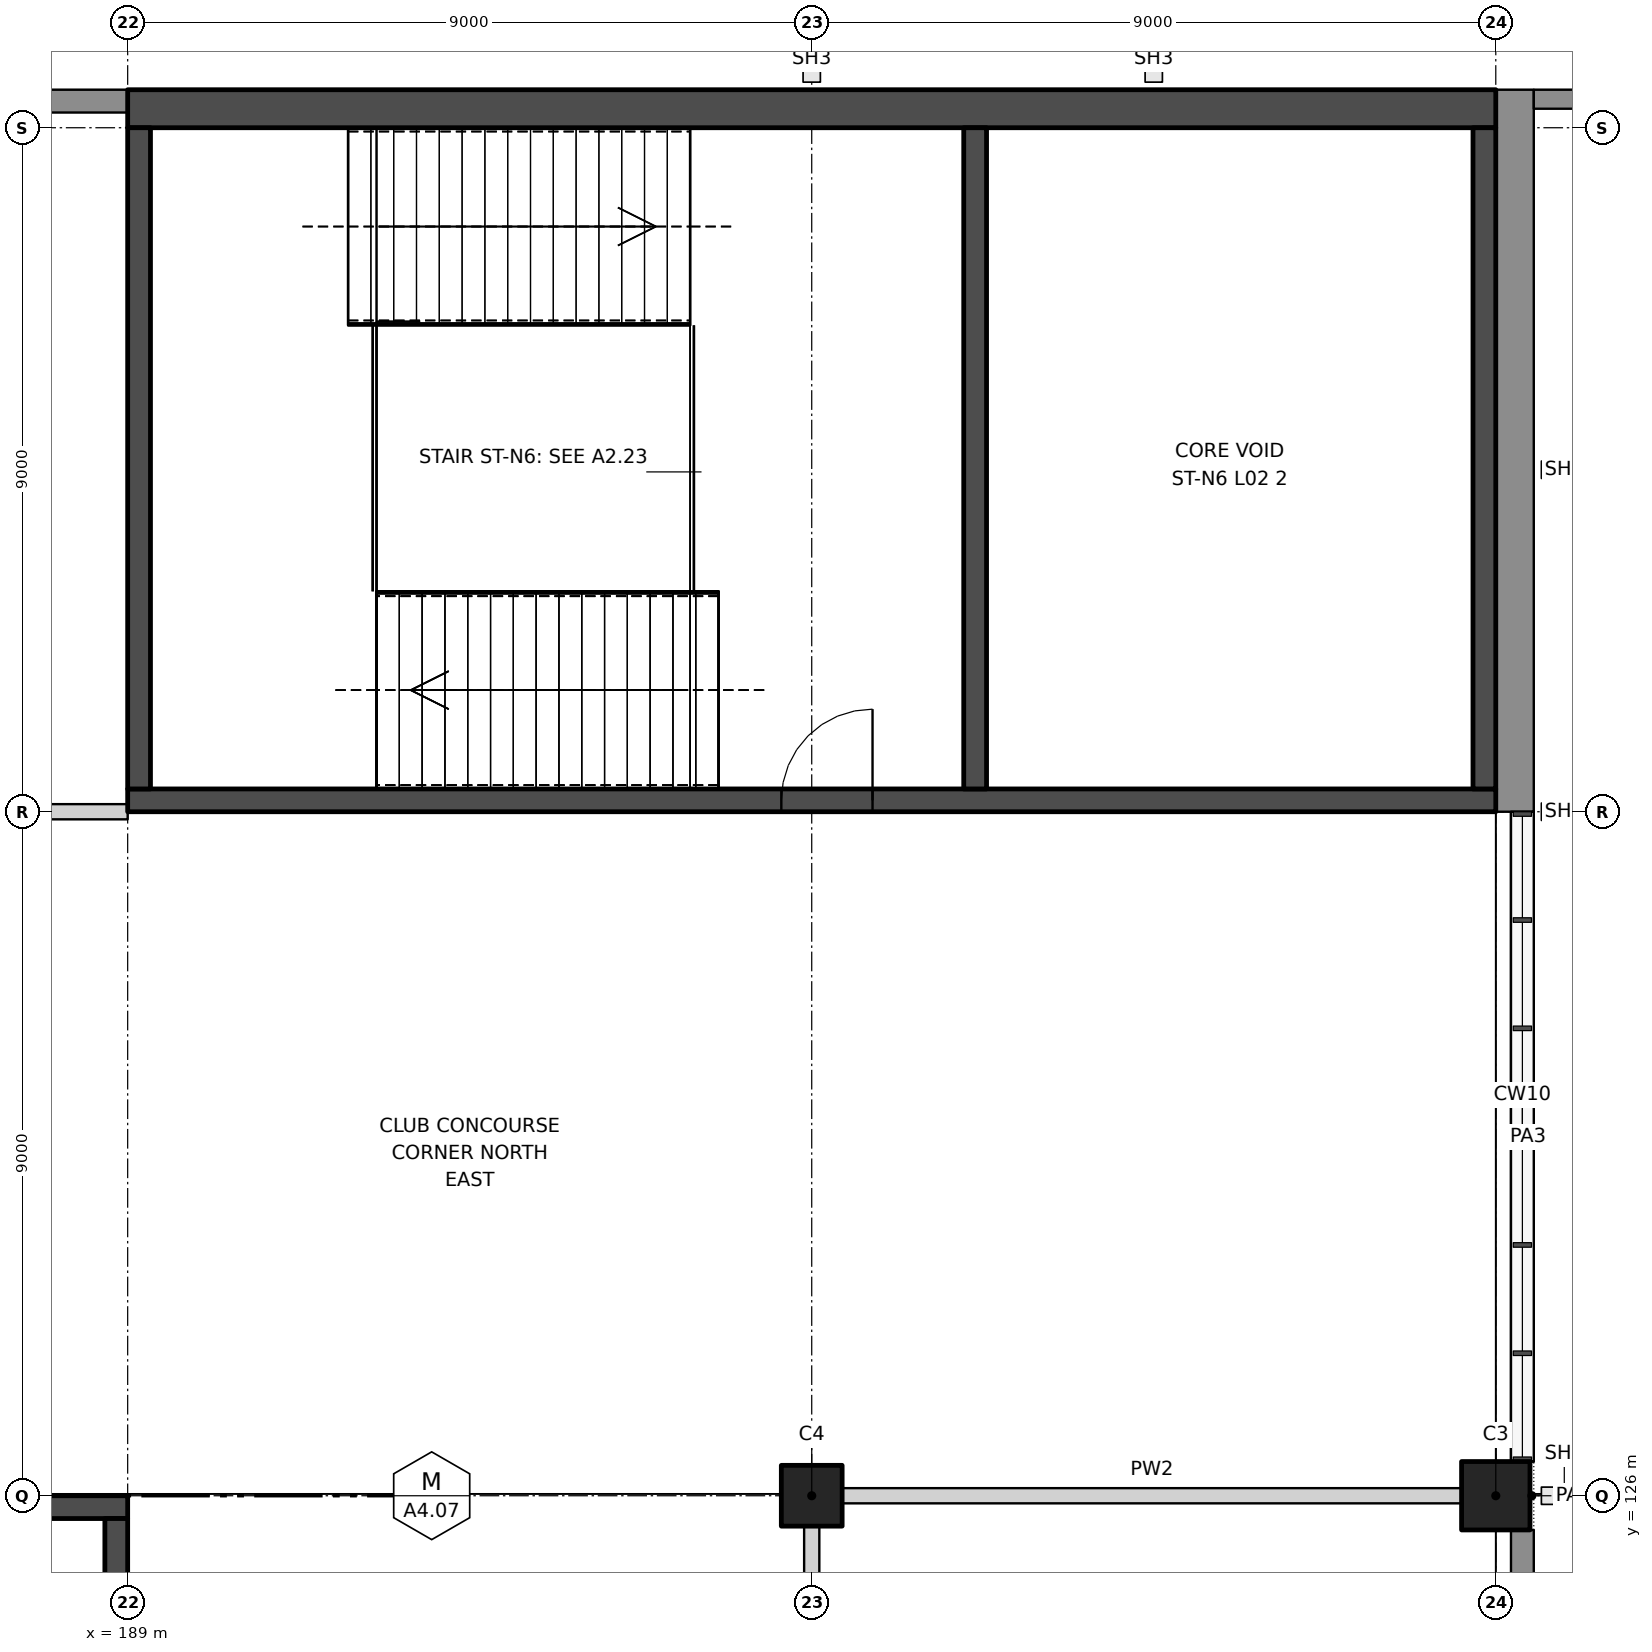
"""IFC4 building model, lengths in metres.
Left out: names, types, materials, properties, quantities, classifications, styles, units other than length and angle.
Written with IfcOpenShell. Run it as: python <this file> out.ifc"""

import sys

from ifc_helpers import new_model, si_unit, direction, frame, frame_2d, origin, origin_2d, place, context, subcontext, project, spatial, rectangle, extrude, element, fill, save


model = new_model("IFC4")
c1 = context("Model", 3, precision=1e-05, world=origin(), true_north=direction((0.0, 1.0)))
c2 = subcontext(c1, "Body", "Model", "MODEL_VIEW")
j1 = project(units=[si_unit("LENGTHUNIT", "METRE"), si_unit("PLANEANGLEUNIT", "RADIAN")], contexts=[c1])
p1 = place(None, origin())
s1 = spatial("IfcSite", under=j1, at=p1, CompositionType="ELEMENT")
p2 = place(p1, origin())
s2 = spatial("IfcBuilding", under=s1, at=p2, CompositionType="ELEMENT")
p3 = place(p2, frame((0.0, 0.0, 11.5)))
s3 = spatial("IfcBuildingStorey", under=s2, at=p3, CompositionType="ELEMENT", Elevation=11.5)
p4 = place(p3, frame((207.0, 126.0, 0.0), z_axis=(0.0, 0.0, 1.0), x_axis=(1.0, 0.0, 0.0)))
e1 = element("IfcColumn", 1, at=p4, inside=s3, PredefinedType="COLUMN", context=c2, shape_type="SweptSolid", body=[
    extrude(rectangle(XDim=0.9, YDim=0.9, at=origin_2d()), origin(), (0.0, 0.0, 1.0), 10.5),
])
p5 = place(p3, frame((198.0, 126.0, 0.0), z_axis=(0.0, 0.0, 1.0), x_axis=(1.0, 0.0, 0.0)))
e2 = element("IfcColumn", 2, at=p5, inside=s3, PredefinedType="COLUMN", context=c2, shape_type="SweptSolid", body=[
    extrude(rectangle(XDim=0.8, YDim=0.8, at=origin_2d()), origin(), (0.0, 0.0, 1.0), 10.5),
])
p6 = place(p3, frame((198.4, 126.0, 0.0), z_axis=(0.0, 0.0, 1.0), x_axis=(1.0, 0.0, 0.0)))
e3 = element("IfcWall", 3, at=p6, inside=s3, PredefinedType="PARTITIONING", context=c2, shape_type="SweptSolid", body=[
    extrude(rectangle(XDim=8.15, YDim=0.2, at=frame_2d((4.075, 0.0))), origin(), (0.0, 0.0, 1.0), 9.25),
])
p7 = place(p3, frame((186.1, 135.0, 0.0), z_axis=(0.0, 0.0, 1.0), x_axis=(1.0, 0.0, 0.0)))
e4 = element("IfcWall", 4, at=p7, inside=s3, PredefinedType="PARTITIONING", context=c2, shape_type="SweptSolid", body=[
    extrude(rectangle(XDim=2.9, YDim=0.2, at=frame_2d((1.45, 0.0))), origin(), (0.0, 0.0, 1.0), 9.15),
])
p8 = place(p3, frame((198.0, 117.4, 0.0), z_axis=(0.0, 0.0, 1.0), x_axis=(0.0, 1.0, 0.0)))
e5 = element("IfcWall", 5, at=p8, inside=s3, PredefinedType="PARTITIONING", context=c2, shape_type="SweptSolid", body=[
    extrude(rectangle(XDim=8.2, YDim=0.2, at=frame_2d((4.1, 0.0))), origin(), (0.0, 0.0, 1.0), 9.25),
])
p9 = place(p8, frame((3.6, 0.0, 0.0)))
e6 = element("IfcOpeningElement", 6, at=p9, cuts=e5, PredefinedType="OPENING", context=c2, shape_type="SweptSolid", body=[
    extrude(rectangle(XDim=1.0, YDim=2.1, at=frame_2d((0.5, 1.05))), frame((0.0, 0.11, 0.0), z_axis=(0.0, -1.0, 0.0), x_axis=(1.0, 0.0, 0.0)), (0.0, 0.0, 1.0), 0.22),
])
p10 = place(p3, frame((207.35, 117.45, 0.0), z_axis=(0.0, 0.0, 1.0), x_axis=(0.0, 1.0, 0.0)))
e7 = element("IfcWall", 7, at=p10, inside=s3, PredefinedType="SOLIDWALL", context=c2, shape_type="SweptSolid", body=[
    extrude(rectangle(XDim=8.1, YDim=0.3, at=frame_2d((4.05, 0.0))), origin(), (0.0, 0.0, 1.0), 10.5),
])
p11 = place(p3, frame((207.35, 126.45, 0.0), z_axis=(0.0, 0.0, 1.0), x_axis=(0.0, 1.0, 0.0)))
e8 = element("IfcWall", 8, at=p11, inside=s3, PredefinedType="SOLIDWALL", context=c2, shape_type="SweptSolid", body=[
    extrude(rectangle(XDim=8.55, YDim=0.3, at=frame_2d((4.275, 0.0))), origin(), (0.0, 0.0, 1.0), 1.0),
])
p12 = place(p3, frame((207.25, 135.0, 0.0), z_axis=(0.0, 0.0, 1.0), x_axis=(0.0, 1.0, 0.0)))
e9 = element("IfcWall", 9, at=p12, inside=s3, PredefinedType="SOLIDWALL", context=c2, shape_type="SweptSolid", body=[
    extrude(rectangle(XDim=9.5, YDim=0.5, at=frame_2d((4.75, 0.0))), origin(), (0.0, 0.0, 1.0), 10.5),
])
p13 = place(p3, frame((189.0, 144.35, 0.0), z_axis=(0.0, 0.0, 1.0), x_axis=(-1.0, 0.0, 0.0)))
e10 = element("IfcWall", 10, at=p13, inside=s3, PredefinedType="SOLIDWALL", context=c2, shape_type="SweptSolid", body=[
    extrude(rectangle(XDim=9.0, YDim=0.3, at=frame_2d((4.5, 0.0))), origin(), (0.0, 0.0, 1.0), 10.5),
])
p14 = place(p3, frame((221.0, 144.375, 0.0), z_axis=(0.0, 0.0, 1.0), x_axis=(-1.0, 0.0, 0.0)))
e11 = element("IfcWall", 11, at=p14, inside=s3, PredefinedType="PARAPET", context=c2, shape_type="SweptSolid", body=[
    extrude(rectangle(XDim=13.5, YDim=0.25, at=frame_2d((6.75, 0.0))), origin(), (0.0, 0.0, 1.0), 1.2),
])
p15 = place(p3, frame((189.0, 135.15, 0.0), z_axis=(0.0, 0.0, 1.0), x_axis=(1.0, 0.0, 0.0)))
e12 = element("IfcWall", 12, at=p15, inside=s3, PredefinedType="SHEAR", context=c2, shape_type="SweptSolid", body=[
    extrude(rectangle(XDim=18.0, YDim=0.3, at=frame_2d((9.0, 0.0))), origin(), (0.0, 0.0, 1.0), 10.5),
])
p16 = place(p15, frame((8.6, 0.0, 0.0)))
e13 = element("IfcOpeningElement", 13, at=p16, cuts=e12, PredefinedType="OPENING", context=c2, shape_type="SweptSolid", body=[
    extrude(rectangle(XDim=1.2, YDim=2.1, at=frame_2d((0.6, 1.05))), frame((0.0, 0.16, 0.0), z_axis=(0.0, -1.0, 0.0), x_axis=(1.0, 0.0, 0.0)), (0.0, 0.0, 1.0), 0.32),
])
p17 = place(p3, frame((189.0, 144.25, 0.0), z_axis=(0.0, 0.0, 1.0), x_axis=(1.0, 0.0, 0.0)))
e14 = element("IfcWall", 14, at=p17, inside=s3, PredefinedType="SHEAR", context=c2, shape_type="SweptSolid", body=[
    extrude(rectangle(XDim=18.0, YDim=0.5, at=frame_2d((9.0, 0.0))), origin(), (0.0, 0.0, 1.0), 10.5),
])
for number, where, z_axis, x_axis in (
    (15, (189.15, 135.3, 0.0), (0.0, 0.0, 1.0), (0.0, 1.0, 0.0)),
    (16, (206.85, 135.3, 0.0), (0.0, 0.0, 1.0), (0.0, 1.0, 0.0)),
    (17, (200.15, 135.3, 0.0), (0.0, 0.0, 1.0), (0.0, 1.0, 0.0)),
):
    element("IfcWall", number, at=place(p3, frame(where, z_axis=z_axis, x_axis=x_axis)), inside=s3, PredefinedType="SHEAR", context=c2, shape_type="SweptSolid", body=[
        extrude(rectangle(XDim=8.7, YDim=0.3, at=frame_2d((4.35, 0.0))), origin(), (0.0, 0.0, 1.0), 10.5),
    ])
p18 = place(p3, frame((171.0, 125.85, 0.0), z_axis=(0.0, 0.0, 1.0), x_axis=(1.0, 0.0, 0.0)))
e18 = element("IfcWall", 18, at=p18, inside=s3, PredefinedType="SHEAR", context=c2, shape_type="SweptSolid", body=[
    extrude(rectangle(XDim=18.0, YDim=0.3, at=frame_2d((9.0, 0.0))), origin(), (0.0, 0.0, 1.0), 10.5),
])
p19 = place(p3, frame((188.85, 117.3, 0.0), z_axis=(0.0, 0.0, 1.0), x_axis=(0.0, 1.0, 0.0)))
e19 = element("IfcWall", 19, at=p19, inside=s3, PredefinedType="SHEAR", context=c2, shape_type="SweptSolid", body=[
    extrude(rectangle(XDim=8.4, YDim=0.3, at=frame_2d((4.2, 0.0))), origin(), (0.0, 0.0, 1.0), 10.5),
])
p20 = place(p16, origin())
e20 = element("IfcDoor", 20, at=p20, inside=s3, OperationType="SINGLE_SWING_RIGHT", PredefinedType="DOOR", context=c2, shape_type="SweptSolid", body=[
    extrude(rectangle(XDim=1.2, YDim=2.1, at=frame_2d((0.6, 1.05))), frame((0.0, 0.025, 0.0), z_axis=(0.0, -1.0, 0.0), x_axis=(1.0, 0.0, 0.0)), (0.0, 0.0, 1.0), 0.05),
])
fill(e13, e20)
save(model, sys.argv[1])
